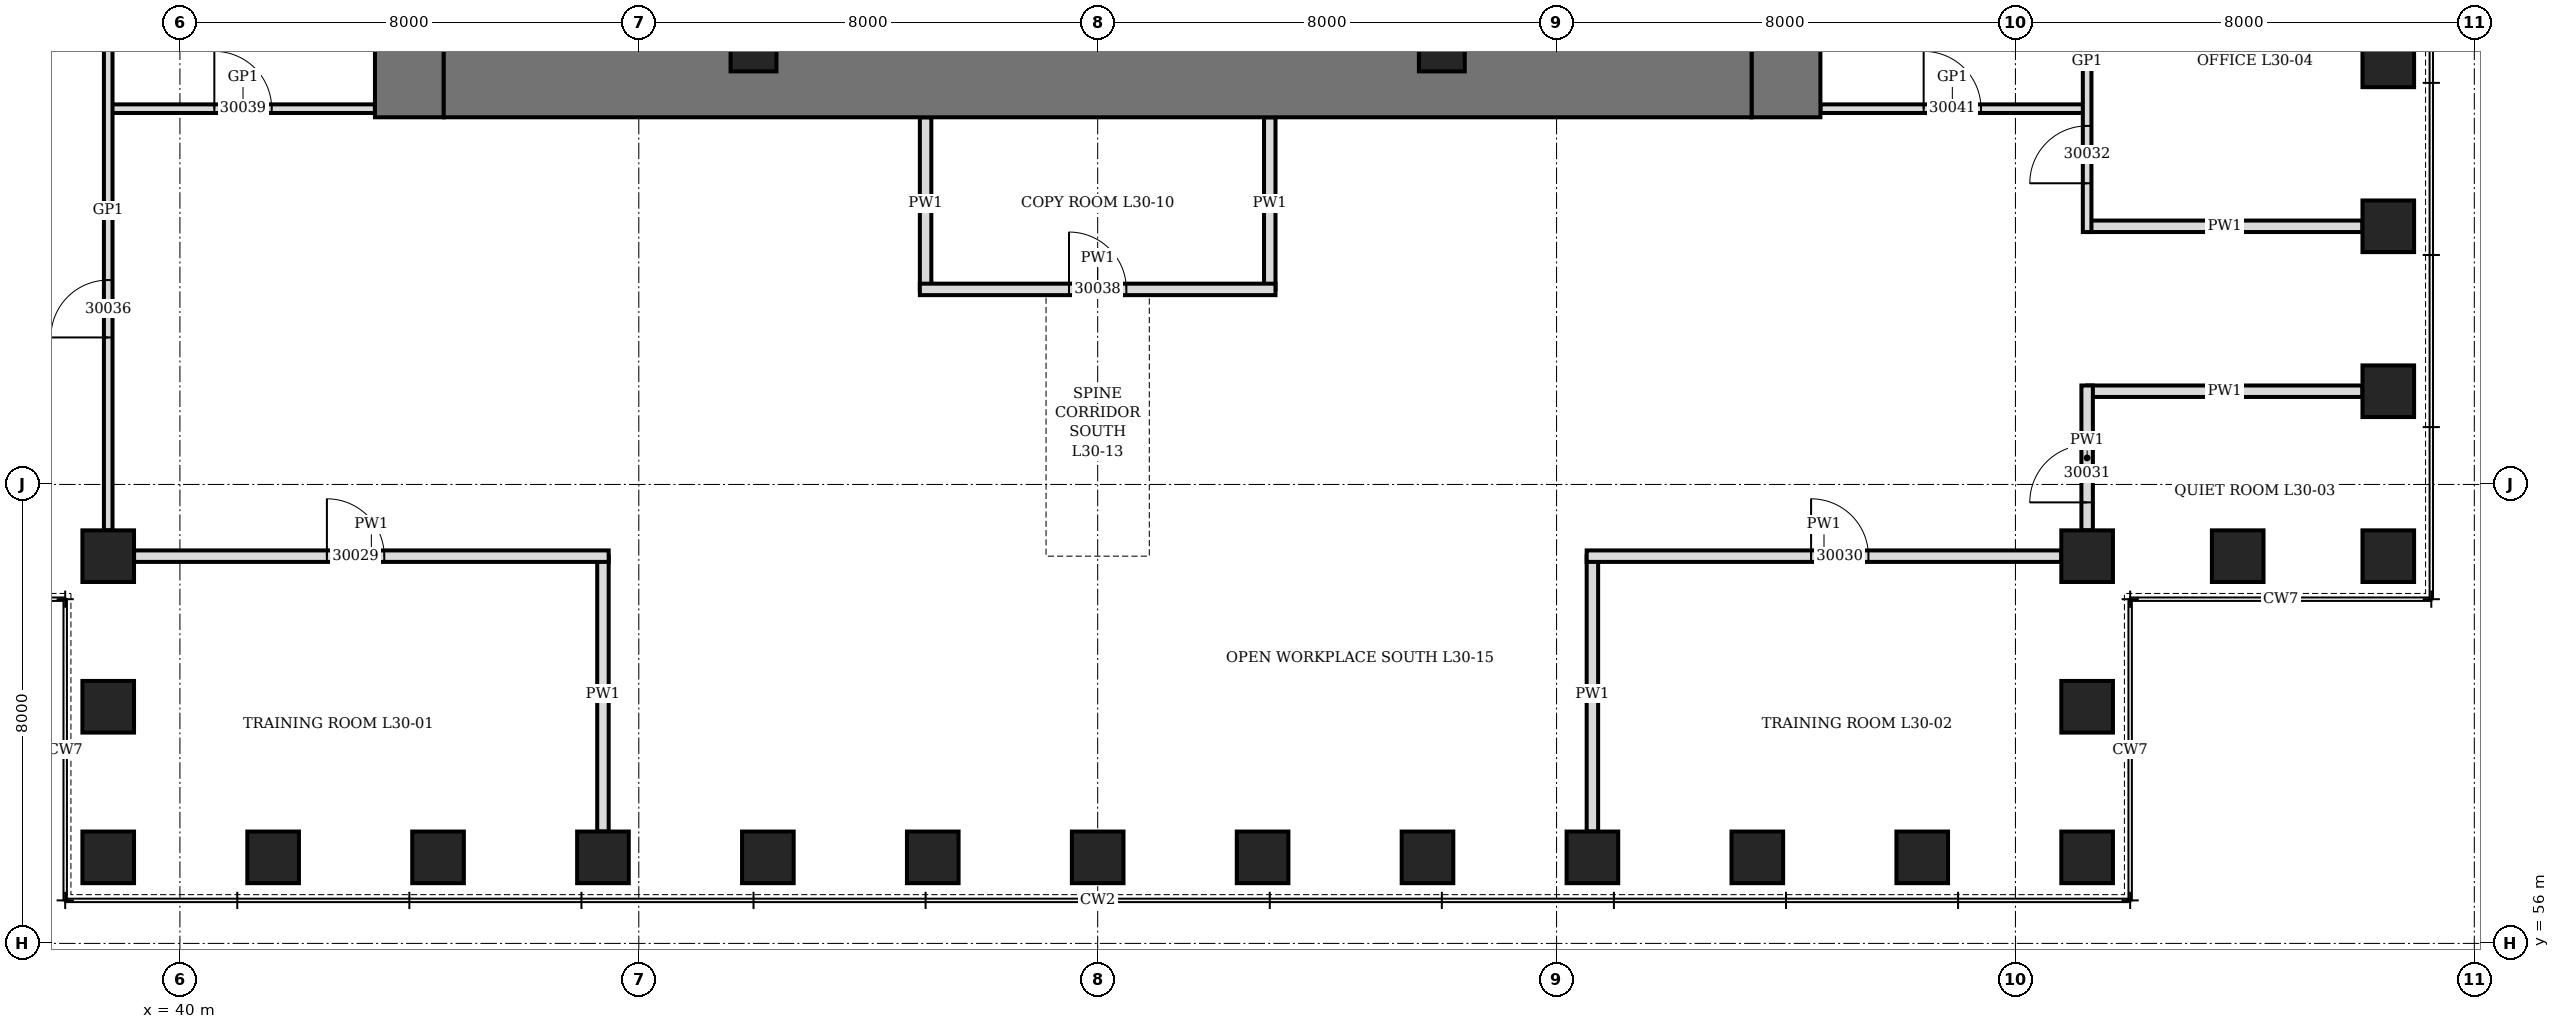
"""IFC4 building model, lengths in metres.
Left out: names, types, materials, properties, quantities, classifications, styles, units other than length and angle.
Written with IfcOpenShell. Run it as: python <this file> out.ifc"""

import sys

from ifc_helpers import new_model, si_unit, direction, frame, frame_2d, origin, origin_2d, place, context, subcontext, project, spatial, rectangle, hollow_rectangle, extrude, element, fill, save


model = new_model("IFC4")
c1 = context("Model", 3, precision=1e-05, world=origin(), true_north=direction((0.0, 1.0)))
c2 = subcontext(c1, "Body", "Model", "MODEL_VIEW")
j1 = project(units=[si_unit("LENGTHUNIT", "METRE"), si_unit("PLANEANGLEUNIT", "RADIAN")], contexts=[c1])
p1 = place(None, origin())
s1 = spatial("IfcSite", under=j1, at=p1, CompositionType="ELEMENT")
p2 = place(p1, origin())
s2 = spatial("IfcBuilding", under=s1, at=p2, CompositionType="ELEMENT")
p3 = place(p2, frame((0.0, 0.0, 137.5)))
s3 = spatial("IfcBuildingStorey", under=s2, at=p3, CompositionType="ELEMENT", Elevation=137.5)
for number, where, z_axis, x_axis in (
    (1, (38.75, 57.5, 0.0), (0.0, 0.0, 1.0), (1.0, 0.0, 0.0)),
    (2, (41.625, 57.5, 0.0), (0.0, 0.0, 1.0), (1.0, 0.0, 0.0)),
    (3, (44.5, 57.5, 0.0), (0.0, 0.0, 1.0), (1.0, 0.0, 0.0)),
    (4, (47.375, 57.5, 0.0), (0.0, 0.0, 1.0), (1.0, 0.0, 0.0)),
    (5, (50.25, 57.5, 0.0), (0.0, 0.0, 1.0), (1.0, 0.0, 0.0)),
    (6, (53.125, 57.5, 0.0), (0.0, 0.0, 1.0), (1.0, 0.0, 0.0)),
    (7, (56.0, 57.5, 0.0), (0.0, 0.0, 1.0), (1.0, 0.0, 0.0)),
    (8, (58.875, 57.5, 0.0), (0.0, 0.0, 1.0), (1.0, 0.0, 0.0)),
    (9, (61.75, 57.5, 0.0), (0.0, 0.0, 1.0), (1.0, 0.0, 0.0)),
    (10, (64.625, 57.5, 0.0), (0.0, 0.0, 1.0), (1.0, 0.0, 0.0)),
    (11, (67.5, 57.5, 0.0), (0.0, 0.0, 1.0), (1.0, 0.0, 0.0)),
    (12, (70.375, 57.5, 0.0), (0.0, 0.0, 1.0), (1.0, 0.0, 0.0)),
    (13, (73.25, 57.5, 0.0), (0.0, 0.0, 1.0), (0.0, 1.0, 0.0)),
    (14, (73.25, 60.125, 0.0), (0.0, 0.0, 1.0), (0.0, 1.0, 0.0)),
    (15, (73.25, 62.75, 0.0), (0.0, 0.0, 1.0), (1.0, 0.0, 0.0)),
    (16, (75.875, 62.75, 0.0), (0.0, 0.0, 1.0), (1.0, 0.0, 0.0)),
    (17, (78.5, 62.75, 0.0), (0.0, 0.0, 1.0), (0.0, 1.0, 0.0)),
    (18, (78.5, 65.625, 0.0), (0.0, 0.0, 1.0), (0.0, 1.0, 0.0)),
    (19, (78.5, 68.5, 0.0), (0.0, 0.0, 1.0), (0.0, 1.0, 0.0)),
    (20, (78.5, 71.375, 0.0), (0.0, 0.0, 1.0), (0.0, 1.0, 0.0)),
    (21, (38.75, 62.75, 0.0), (0.0, 0.0, 1.0), (0.0, 1.0, 0.0)),
    (22, (38.75, 60.125, 0.0), (0.0, 0.0, 1.0), (0.0, 1.0, 0.0)),
):
    element("IfcColumn", number, at=place(p3, frame(where, z_axis=z_axis, x_axis=x_axis)), inside=s3, PredefinedType="COLUMN", context=c2, shape_type="SweptSolid", body=[
        extrude(hollow_rectangle(XDim=0.9, YDim=0.9, WallThickness=0.15, at=origin_2d()), origin(), (0.0, 0.0, 1.0), 4.2),
    ])
p4 = place(p3, frame((44.0, 70.4, 0.0), z_axis=(0.0, 0.0, 1.0), x_axis=(0.0, 1.0, 0.0)))
e23 = element("IfcWall", 23, at=p4, inside=s3, PredefinedType="SHEAR", context=c2, shape_type="SweptSolid", body=[
    extrude(rectangle(XDim=19.2, YDim=1.2, at=frame_2d((9.6, 0.0))), origin(), (0.0, 0.0, 1.0), 4.2),
])
p5 = place(p4, frame((8.6, 0.0, 0.0)))
e24 = element("IfcOpeningElement", 24, at=p5, cuts=e23, PredefinedType="OPENING", context=c2, shape_type="SweptSolid", body=[
    extrude(rectangle(XDim=2.0, YDim=2.4, at=frame_2d((1.0, 1.2))), frame((0.0, 0.61, 0.0), z_axis=(0.0, -1.0, 0.0), x_axis=(1.0, 0.0, 0.0)), (0.0, 0.0, 1.0), 1.22),
])
p6 = place(p3, frame((68.0, 70.4, 0.0), z_axis=(0.0, 0.0, 1.0), x_axis=(0.0, 1.0, 0.0)))
e25 = element("IfcWall", 25, at=p6, inside=s3, PredefinedType="SHEAR", context=c2, shape_type="SweptSolid", body=[
    extrude(rectangle(XDim=19.2, YDim=1.2, at=frame_2d((9.6, 0.0))), origin(), (0.0, 0.0, 1.0), 4.2),
])
p7 = place(p6, frame((8.6, 0.0, 0.0)))
e26 = element("IfcOpeningElement", 26, at=p7, cuts=e25, PredefinedType="OPENING", context=c2, shape_type="SweptSolid", body=[
    extrude(rectangle(XDim=2.0, YDim=2.4, at=frame_2d((1.0, 1.2))), frame((0.0, 0.61, 0.0), z_axis=(0.0, -1.0, 0.0), x_axis=(1.0, 0.0, 0.0)), (0.0, 0.0, 1.0), 1.22),
])
p8 = place(p3, frame((44.6, 71.0, 0.0), z_axis=(0.0, 0.0, 1.0), x_axis=(1.0, 0.0, 0.0)))
e27 = element("IfcWall", 27, at=p8, inside=s3, PredefinedType="SHEAR", context=c2, shape_type="SweptSolid", body=[
    extrude(rectangle(XDim=22.8, YDim=1.2, at=frame_2d((11.4, 0.0))), origin(), (0.0, 0.0, 1.0), 4.2),
])
for number, where, z_axis, x_axis in (
    (28, (50.0, 71.6, 0.0), (0.0, 0.0, 1.0), (1.0, 0.0, 0.0)),
    (29, (62.0, 71.6, 0.0), (0.0, 0.0, 1.0), (1.0, 0.0, 0.0)),
):
    element("IfcColumn", number, at=place(p3, frame(where, z_axis=z_axis, x_axis=x_axis)), inside=s3, PredefinedType="COLUMN", context=c2, shape_type="SweptSolid", body=[
        extrude(hollow_rectangle(XDim=0.8, YDim=0.8, WallThickness=0.1, at=origin_2d()), origin(), (0.0, 0.0, 1.0), 4.2),
    ])
for number, where, z_axis, x_axis in (
    (30, (47.375, 57.95, 0.0), (0.0, 0.0, 1.0), (0.0, 1.0, 0.0)),
    (31, (64.625, 57.95, 0.0), (0.0, 0.0, 1.0), (0.0, 1.0, 0.0)),
):
    element("IfcWall", number, at=place(p3, frame(where, z_axis=z_axis, x_axis=x_axis)), inside=s3, PredefinedType="PARTITIONING", context=c2, shape_type="SweptSolid", body=[
        extrude(rectangle(XDim=4.8, YDim=0.2, at=frame_2d((2.4, 0.0))), origin(), (0.0, 0.0, 1.0), 3.278),
    ])
for number, where, z_axis, x_axis in (
    (32, (73.25, 65.625, 0.0), (0.0, 0.0, 1.0), (1.0, 0.0, 0.0)),
    (33, (73.25, 68.5, 0.0), (0.0, 0.0, 1.0), (1.0, 0.0, 0.0)),
):
    element("IfcWall", number, at=place(p3, frame(where, z_axis=z_axis, x_axis=x_axis)), inside=s3, PredefinedType="PARTITIONING", context=c2, shape_type="SweptSolid", body=[
        extrude(rectangle(XDim=4.8, YDim=0.2, at=frame_2d((2.4, 0.0))), origin(), (0.0, 0.0, 1.0), 3.428),
    ])
for number, where, z_axis, x_axis in (
    (34, (53.0, 67.4, 0.0), (0.0, 0.0, 1.0), (0.0, 1.0, 0.0)),
    (35, (59.0, 67.4, 0.0), (0.0, 0.0, 1.0), (0.0, 1.0, 0.0)),
):
    element("IfcWall", number, at=place(p3, frame(where, z_axis=z_axis, x_axis=x_axis)), inside=s3, PredefinedType="PARTITIONING", context=c2, shape_type="SweptSolid", body=[
        extrude(rectangle(XDim=3.0, YDim=0.2, at=frame_2d((1.5, 0.0))), origin(), (0.0, 0.0, 1.0), 3.278),
    ])
p9 = place(p3, frame((39.2, 62.75, 0.0), z_axis=(0.0, 0.0, 1.0), x_axis=(1.0, 0.0, 0.0)))
e36 = element("IfcWall", 36, at=p9, inside=s3, PredefinedType="PARTITIONING", context=c2, shape_type="SweptSolid", body=[
    extrude(rectangle(XDim=8.275, YDim=0.2, at=frame_2d((4.138, 0.0))), origin(), (0.0, 0.0, 1.0), 4.04),
])
p10 = place(p9, frame((3.363, 0.0, 0.0)))
e37 = element("IfcOpeningElement", 37, at=p10, cuts=e36, PredefinedType="OPENING", context=c2, shape_type="SweptSolid", body=[
    extrude(rectangle(XDim=1.0, YDim=2.1, at=frame_2d((0.5, 1.05))), frame((0.0, 0.11, 0.0), z_axis=(0.0, -1.0, 0.0), x_axis=(1.0, 0.0, 0.0)), (0.0, 0.0, 1.0), 0.22),
])
p11 = place(p3, frame((64.525, 62.75, 0.0), z_axis=(0.0, 0.0, 1.0), x_axis=(1.0, 0.0, 0.0)))
e38 = element("IfcWall", 38, at=p11, inside=s3, PredefinedType="PARTITIONING", context=c2, shape_type="SweptSolid", body=[
    extrude(rectangle(XDim=8.275, YDim=0.2, at=frame_2d((4.138, 0.0))), origin(), (0.0, 0.0, 1.0), 4.04),
])
p12 = place(p11, frame((3.913, 0.0, 0.0)))
e39 = element("IfcOpeningElement", 39, at=p12, cuts=e38, PredefinedType="OPENING", context=c2, shape_type="SweptSolid", body=[
    extrude(rectangle(XDim=1.0, YDim=2.1, at=frame_2d((0.5, 1.05))), frame((0.0, 0.11, 0.0), z_axis=(0.0, -1.0, 0.0), x_axis=(1.0, 0.0, 0.0)), (0.0, 0.0, 1.0), 0.22),
])
p13 = place(p3, frame((52.9, 67.4, 0.0), z_axis=(0.0, 0.0, 1.0), x_axis=(1.0, 0.0, 0.0)))
e40 = element("IfcWall", 40, at=p13, inside=s3, PredefinedType="PARTITIONING", context=c2, shape_type="SweptSolid", body=[
    extrude(rectangle(XDim=6.2, YDim=0.2, at=frame_2d((3.1, 0.0))), origin(), (0.0, 0.0, 1.0), 4.04),
])
p14 = place(p13, frame((2.6, 0.0, 0.0)))
e41 = element("IfcOpeningElement", 41, at=p14, cuts=e40, PredefinedType="OPENING", context=c2, shape_type="SweptSolid", body=[
    extrude(rectangle(XDim=1.0, YDim=2.1, at=frame_2d((0.5, 1.05))), frame((0.0, 0.11, 0.0), z_axis=(0.0, -1.0, 0.0), x_axis=(1.0, 0.0, 0.0)), (0.0, 0.0, 1.0), 0.22),
])
p15 = place(p3, frame((38.8, 70.55, 0.0), z_axis=(0.0, 0.0, 1.0), x_axis=(1.0, 0.0, 0.0)))
e42 = element("IfcWall", 42, at=p15, inside=s3, PredefinedType="PARTITIONING", context=c2, shape_type="SweptSolid", body=[
    extrude(rectangle(XDim=4.6, YDim=0.15, at=frame_2d((2.3, 0.0))), origin(), (0.0, 0.0, 1.0), 4.04),
])
p16 = place(p15, frame((1.8, 0.0, 0.0)))
e43 = element("IfcOpeningElement", 43, at=p16, cuts=e42, PredefinedType="OPENING", context=c2, shape_type="SweptSolid", body=[
    extrude(rectangle(XDim=1.0, YDim=2.4, at=frame_2d((0.5, 1.2))), frame((0.0, 0.085, 0.0), z_axis=(0.0, -1.0, 0.0), x_axis=(1.0, 0.0, 0.0)), (0.0, 0.0, 1.0), 0.17),
])
p17 = place(p3, frame((68.6, 70.55, 0.0), z_axis=(0.0, 0.0, 1.0), x_axis=(1.0, 0.0, 0.0)))
e44 = element("IfcWall", 44, at=p17, inside=s3, PredefinedType="PARTITIONING", context=c2, shape_type="SweptSolid", body=[
    extrude(rectangle(XDim=4.6, YDim=0.15, at=frame_2d((2.3, 0.0))), origin(), (0.0, 0.0, 1.0), 4.04),
])
p18 = place(p17, frame((1.8, 0.0, 0.0)))
e45 = element("IfcOpeningElement", 45, at=p18, cuts=e44, PredefinedType="OPENING", context=c2, shape_type="SweptSolid", body=[
    extrude(rectangle(XDim=1.0, YDim=2.4, at=frame_2d((0.5, 1.2))), frame((0.0, 0.085, 0.0), z_axis=(0.0, -1.0, 0.0), x_axis=(1.0, 0.0, 0.0)), (0.0, 0.0, 1.0), 0.17),
])
p19 = place(p3, frame((38.75, 63.2, 0.0), z_axis=(0.0, 0.0, 1.0), x_axis=(0.0, 1.0, 0.0)))
e46 = element("IfcWall", 46, at=p19, inside=s3, PredefinedType="PARTITIONING", context=c2, shape_type="SweptSolid", body=[
    extrude(rectangle(XDim=11.15, YDim=0.15, at=frame_2d((5.575, 0.0))), origin(), (0.0, 0.0, 1.0), 4.04),
])
p20 = place(p19, frame((3.363, 0.0, 0.0)))
e47 = element("IfcOpeningElement", 47, at=p20, cuts=e46, PredefinedType="OPENING", context=c2, shape_type="SweptSolid", body=[
    extrude(rectangle(XDim=1.0, YDim=2.4, at=frame_2d((0.5, 1.2))), frame((0.0, 0.085, 0.0), z_axis=(0.0, -1.0, 0.0), x_axis=(1.0, 0.0, 0.0)), (0.0, 0.0, 1.0), 0.17),
])
p21 = place(p3, frame((73.25, 68.4, 0.0), z_axis=(0.0, 0.0, 1.0), x_axis=(0.0, 1.0, 0.0)))
e48 = element("IfcWall", 48, at=p21, inside=s3, PredefinedType="PARTITIONING", context=c2, shape_type="SweptSolid", body=[
    extrude(rectangle(XDim=5.95, YDim=0.15, at=frame_2d((2.975, 0.0))), origin(), (0.0, 0.0, 1.0), 4.04),
])
p22 = place(p21, frame((0.85, 0.0, 0.0)))
e49 = element("IfcOpeningElement", 49, at=p22, cuts=e48, PredefinedType="OPENING", context=c2, shape_type="SweptSolid", body=[
    extrude(rectangle(XDim=1.0, YDim=2.1, at=frame_2d((0.5, 1.05))), frame((0.0, 0.085, 0.0), z_axis=(0.0, -1.0, 0.0), x_axis=(1.0, 0.0, 0.0)), (0.0, 0.0, 1.0), 0.17),
])
p23 = place(p3, frame((73.25, 63.2, 0.0), z_axis=(0.0, 0.0, 1.0), x_axis=(0.0, 1.0, 0.0)))
e50 = element("IfcWall", 50, at=p23, inside=s3, PredefinedType="PARTITIONING", context=c2, shape_type="SweptSolid", body=[
    extrude(rectangle(XDim=2.525, YDim=0.2, at=frame_2d((1.263, 0.0))), origin(), (0.0, 0.0, 1.0), 4.04),
])
p24 = place(p23, frame((0.488, 0.0, 0.0)))
e51 = element("IfcOpeningElement", 51, at=p24, cuts=e50, PredefinedType="OPENING", context=c2, shape_type="SweptSolid", body=[
    extrude(rectangle(XDim=1.0, YDim=2.1, at=frame_2d((0.5, 1.05))), frame((0.0, 0.11, 0.0), z_axis=(0.0, -1.0, 0.0), x_axis=(1.0, 0.0, 0.0)), (0.0, 0.0, 1.0), 0.22),
])
p25 = place(p10, origin())
e52 = element("IfcDoor", 52, at=p25, inside=s3, OperationType="SINGLE_SWING_LEFT", PredefinedType="DOOR", context=c2, shape_type="SweptSolid", body=[
    extrude(rectangle(XDim=1.0, YDim=2.1, at=frame_2d((0.5, 1.05))), frame((0.0, 0.1, 0.0), z_axis=(0.0, -1.0, 0.0), x_axis=(1.0, 0.0, 0.0)), (0.0, 0.0, 1.0), 0.199),
])
fill(e37, e52)
p26 = place(p12, origin())
e53 = element("IfcDoor", 53, at=p26, inside=s3, OperationType="SINGLE_SWING_LEFT", PredefinedType="DOOR", context=c2, shape_type="SweptSolid", body=[
    extrude(rectangle(XDim=1.0, YDim=2.1, at=frame_2d((0.5, 1.05))), frame((0.0, 0.1, 0.0), z_axis=(0.0, -1.0, 0.0), x_axis=(1.0, 0.0, 0.0)), (0.0, 0.0, 1.0), 0.199),
])
fill(e39, e53)
p27 = place(p24, origin())
e54 = element("IfcDoor", 54, at=p27, inside=s3, OperationType="SINGLE_SWING_LEFT", PredefinedType="DOOR", context=c2, shape_type="SweptSolid", body=[
    extrude(rectangle(XDim=1.0, YDim=2.1, at=frame_2d((0.5, 1.05))), frame((0.0, 0.1, 0.0), z_axis=(0.0, -1.0, 0.0), x_axis=(1.0, 0.0, 0.0)), (0.0, 0.0, 1.0), 0.199),
])
fill(e51, e54)
p28 = place(p22, origin())
e55 = element("IfcDoor", 55, at=p28, inside=s3, OperationType="SINGLE_SWING_LEFT", PredefinedType="DOOR", context=c2, shape_type="SweptSolid", body=[
    extrude(rectangle(XDim=1.0, YDim=2.1, at=frame_2d((0.5, 1.05))), frame((0.0, 0.075, 0.0), z_axis=(0.0, -1.0, 0.0), x_axis=(1.0, 0.0, 0.0)), (0.0, 0.0, 1.0), 0.149),
])
fill(e49, e55)
p29 = place(p20, origin())
e56 = element("IfcDoor", 56, at=p29, inside=s3, OperationType="SINGLE_SWING_RIGHT", PredefinedType="DOOR", context=c2, shape_type="SweptSolid", body=[
    extrude(rectangle(XDim=1.0, YDim=2.4, at=frame_2d((0.5, 1.2))), frame((0.0, 0.075, 0.0), z_axis=(0.0, -1.0, 0.0), x_axis=(1.0, 0.0, 0.0)), (0.0, 0.0, 1.0), 0.149),
])
fill(e47, e56)
p30 = place(p14, origin())
e57 = element("IfcDoor", 57, at=p30, inside=s3, OperationType="SINGLE_SWING_LEFT", PredefinedType="DOOR", context=c2, shape_type="SweptSolid", body=[
    extrude(rectangle(XDim=1.0, YDim=2.1, at=frame_2d((0.5, 1.05))), frame((0.0, 0.1, 0.0), z_axis=(0.0, -1.0, 0.0), x_axis=(1.0, 0.0, 0.0)), (0.0, 0.0, 1.0), 0.199),
])
fill(e41, e57)
p31 = place(p16, origin())
e58 = element("IfcDoor", 58, at=p31, inside=s3, OperationType="SINGLE_SWING_RIGHT", PredefinedType="DOOR", context=c2, shape_type="SweptSolid", body=[
    extrude(rectangle(XDim=1.0, YDim=2.4, at=frame_2d((0.5, 1.2))), frame((0.0, 0.075, 0.0), z_axis=(0.0, -1.0, 0.0), x_axis=(1.0, 0.0, 0.0)), (0.0, 0.0, 1.0), 0.149),
])
fill(e43, e58)
p32 = place(p18, origin())
e59 = element("IfcDoor", 59, at=p32, inside=s3, OperationType="SINGLE_SWING_RIGHT", PredefinedType="DOOR", context=c2, shape_type="SweptSolid", body=[
    extrude(rectangle(XDim=1.0, YDim=2.4, at=frame_2d((0.5, 1.2))), frame((0.0, 0.075, 0.0), z_axis=(0.0, -1.0, 0.0), x_axis=(1.0, 0.0, 0.0)), (0.0, 0.0, 1.0), 0.149),
])
fill(e45, e59)
save(model, sys.argv[1])
